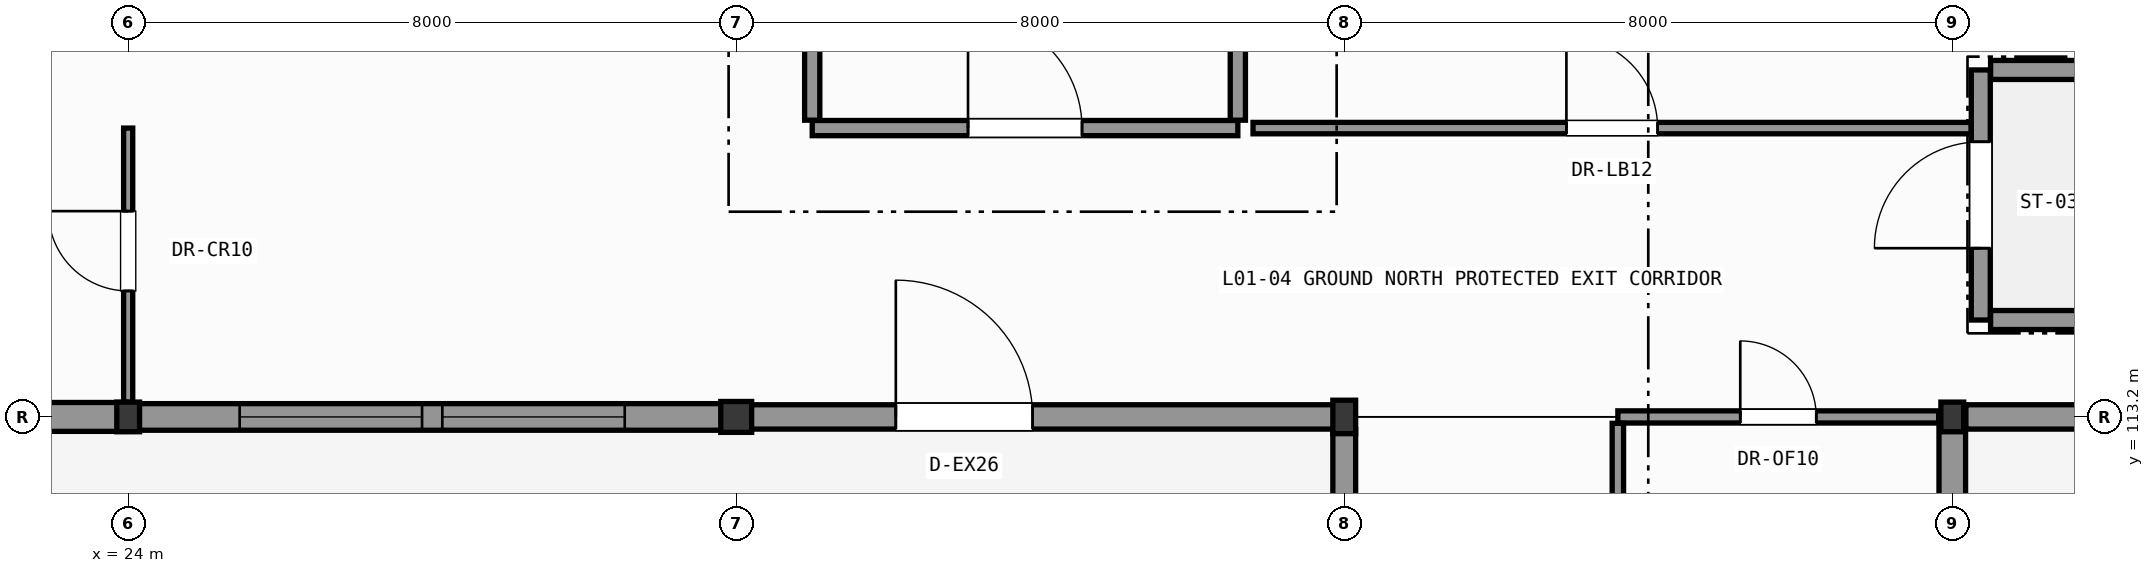
"""IFC4 building model, lengths in metres.
Left out: names, types, materials, properties, quantities, classifications, styles, units other than length and angle.
Written with IfcOpenShell. Run it as: python <this file> out.ifc"""

import sys

from ifc_helpers import new_model, si_unit, direction, frame, frame_2d, origin, origin_2d, place, context, subcontext, project, spatial, rectangle, hollow_circle, i_section, extrude, element, fill, save


model = new_model("IFC4")
c1 = context("Model", 3, precision=1e-05, world=origin(), true_north=direction((0.0, 1.0)))
c2 = subcontext(c1, "Body", "Model", "MODEL_VIEW")
j1 = project(units=[si_unit("LENGTHUNIT", "METRE"), si_unit("PLANEANGLEUNIT", "RADIAN")], contexts=[c1])
p1 = place(None, origin())
s1 = spatial("IfcSite", under=j1, at=p1, CompositionType="ELEMENT")
p2 = place(p1, origin())
s2 = spatial("IfcBuilding", under=s1, at=p2, CompositionType="ELEMENT")
p3 = place(p2, origin())
s3 = spatial("IfcBuildingStorey", under=s2, at=p3, CompositionType="ELEMENT", Elevation=0.0)
p4 = place(p3, frame((24.0, 113.2, 0.0), z_axis=(0.0, 0.0, 1.0), x_axis=(1.0, 0.0, 0.0)))
e1 = element("IfcColumn", 1, at=p4, inside=s3, PredefinedType="COLUMN", context=c2, shape_type="SweptSolid", body=[
    extrude(i_section(OverallWidth=0.3, OverallDepth=0.39, WebThickness=0.011, FlangeThickness=0.019, FilletRadius=0.027, at=origin_2d()), origin(), (0.0, 0.0, 1.0), 7.8),
])
p5 = place(p3, frame((32.0, 113.2, 0.0), z_axis=(0.0, 0.0, 1.0), x_axis=(1.0, 0.0, 0.0)))
e2 = element("IfcColumn", 2, at=p5, inside=s3, PredefinedType="COLUMN", context=c2, shape_type="SweptSolid", body=[
    extrude(hollow_circle(Radius=0.203, WallThickness=0.02, at=origin_2d()), origin(), (0.0, 0.0, 1.0), 7.8),
])
p6 = place(p3, frame((40.0, 113.2, 0.0), z_axis=(0.0, 0.0, 1.0), x_axis=(1.0, 0.0, 0.0)))
e3 = element("IfcColumn", 3, at=p6, inside=s3, PredefinedType="COLUMN", context=c2, shape_type="SweptSolid", body=[
    extrude(i_section(OverallWidth=0.3, OverallDepth=0.44, WebThickness=0.011, FlangeThickness=0.021, FilletRadius=0.027, at=origin_2d()), origin(), (0.0, 0.0, 1.0), 7.8),
])
p7 = place(p3, frame((48.0, 113.2, 0.0), z_axis=(0.0, 0.0, 1.0), x_axis=(1.0, 0.0, 0.0)))
e4 = element("IfcColumn", 4, at=p7, inside=s3, PredefinedType="COLUMN", context=c2, shape_type="SweptSolid", body=[
    extrude(i_section(OverallWidth=0.3, OverallDepth=0.39, WebThickness=0.011, FlangeThickness=0.019, FilletRadius=0.027, at=origin_2d()), origin(), (0.0, 0.0, 1.0), 7.8),
])
p8 = place(p3, frame((48.0, 113.2, 0.0), z_axis=(0.0, 0.0, 1.0), x_axis=(0.0, -1.0, 0.0)))
e5 = element("IfcWall", 5, at=p8, inside=s3, PredefinedType="SOLIDWALL", context=c2, shape_type="SweptSolid", body=[
    extrude(rectangle(XDim=7.6, YDim=0.35, at=frame_2d((3.8, 0.0))), origin(), (0.0, 0.0, 1.0), 6.965),
])
p9 = place(p8, frame((2.6, 0.0, 0.95)))
e6 = element("IfcOpeningElement", 6, at=p9, cuts=e5, PredefinedType="OPENING", context=c2, shape_type="SweptSolid", body=[
    extrude(rectangle(XDim=2.4, YDim=4.6, at=frame_2d((1.2, 2.3))), frame((0.0, 0.185, 0.0), z_axis=(0.0, -1.0, 0.0), x_axis=(1.0, 0.0, 0.0)), (0.0, 0.0, 1.0), 0.37),
])
p10 = place(p3, frame((56.0, 113.2, 0.0), z_axis=(0.0, 0.0, 1.0), x_axis=(-1.0, 0.0, 0.0)))
e7 = element("IfcWall", 7, at=p10, inside=s3, PredefinedType="SOLIDWALL", context=c2, shape_type="SweptSolid", body=[
    extrude(rectangle(XDim=7.821, YDim=0.32, at=frame_2d((3.911, 0.0))), origin(), (0.0, 0.0, 1.0), 7.065),
])
p11 = place(p10, frame((2.71, 0.0, 0.95)))
e8 = element("IfcOpeningElement", 8, at=p11, cuts=e7, PredefinedType="OPENING", context=c2, shape_type="SweptSolid", body=[
    extrude(rectangle(XDim=2.4, YDim=3.0, at=frame_2d((1.2, 1.5))), frame((0.0, 0.17, 0.0), z_axis=(0.0, -1.0, 0.0), x_axis=(1.0, 0.0, 0.0)), (0.0, 0.0, 1.0), 0.34),
])
p12 = place(p3, frame((24.0, 113.2, 0.0), z_axis=(0.0, 0.0, 1.0), x_axis=(-1.0, 0.0, 0.0)))
e9 = element("IfcWall", 9, at=p12, inside=s3, PredefinedType="SOLIDWALL", context=c2, shape_type="SweptSolid", body=[
    extrude(rectangle(XDim=4.8, YDim=0.38, at=frame_2d((2.4, 0.0))), origin(), (0.0, 0.0, 1.0), 7.015),
])
p13 = place(p12, frame((1.3, 0.0, 0.95)))
e10 = element("IfcOpeningElement", 10, at=p13, cuts=e9, PredefinedType="OPENING", context=c2, shape_type="SweptSolid", body=[
    extrude(rectangle(XDim=2.2, YDim=4.2, at=frame_2d((1.1, 2.1))), frame((0.0, 0.2, 0.0), z_axis=(0.0, -1.0, 0.0), x_axis=(1.0, 0.0, 0.0)), (0.0, 0.0, 1.0), 0.4),
])
p14 = place(p3, frame((32.0, 113.2, 0.0), z_axis=(0.0, 0.0, 1.0), x_axis=(-1.0, 0.0, 0.0)))
e11 = element("IfcWall", 11, at=p14, inside=s3, PredefinedType="SOLIDWALL", context=c2, shape_type="SweptSolid", body=[
    extrude(rectangle(XDim=8.0, YDim=0.35, at=frame_2d((4.0, 0.0))), origin(), (0.0, 0.0, 1.0), 7.185),
])
p15 = place(p14, frame((1.467, 0.0, 0.95)))
e12 = element("IfcOpeningElement", 12, at=p15, cuts=e11, PredefinedType="OPENING", context=c2, shape_type="SweptSolid", body=[
    extrude(rectangle(XDim=2.4, YDim=4.6, at=frame_2d((1.2, 2.3))), frame((0.0, 0.185, 0.0), z_axis=(0.0, -1.0, 0.0), x_axis=(1.0, 0.0, 0.0)), (0.0, 0.0, 1.0), 0.37),
])
p16 = place(p14, frame((4.133, 0.0, 0.95)))
e13 = element("IfcOpeningElement", 13, at=p16, cuts=e11, PredefinedType="OPENING", context=c2, shape_type="SweptSolid", body=[
    extrude(rectangle(XDim=2.4, YDim=4.6, at=frame_2d((1.2, 2.3))), frame((0.0, 0.185, 0.0), z_axis=(0.0, -1.0, 0.0), x_axis=(1.0, 0.0, 0.0)), (0.0, 0.0, 1.0), 0.37),
])
p17 = place(p3, frame((40.0, 113.2, 0.0), z_axis=(0.0, 0.0, 1.0), x_axis=(-1.0, 0.0, 0.0)))
e14 = element("IfcWall", 14, at=p17, inside=s3, PredefinedType="SOLIDWALL", context=c2, shape_type="SweptSolid", body=[
    extrude(rectangle(XDim=8.0, YDim=0.32, at=frame_2d((4.0, 0.0))), origin(), (0.0, 0.0, 1.0), 7.145),
])
p18 = place(p17, frame((4.1, 0.0, 0.0)))
e15 = element("IfcOpeningElement", 15, at=p18, cuts=e14, PredefinedType="OPENING", context=c2, shape_type="SweptSolid", body=[
    extrude(rectangle(XDim=1.8, YDim=2.4, at=frame_2d((0.9, 1.2))), frame((0.0, 0.17, 0.0), z_axis=(0.0, -1.0, 0.0), x_axis=(1.0, 0.0, 0.0)), (0.0, 0.0, 1.0), 0.34),
])
p19 = place(p3, frame((40.0, 105.6, 0.0), z_axis=(0.0, 0.0, 1.0), x_axis=(0.0, 1.0, 0.0)))
e16 = element("IfcWall", 16, at=p19, inside=s3, PredefinedType="SOLIDWALL", context=c2, shape_type="SweptSolid", body=[
    extrude(rectangle(XDim=7.436, YDim=0.3, at=frame_2d((3.718, 0.0))), origin(), (0.0, 0.0, 1.0), 6.965),
])
p20 = place(p19, frame((2.618, 0.0, 0.95)))
e17 = element("IfcOpeningElement", 17, at=p20, cuts=e16, PredefinedType="OPENING", context=c2, shape_type="SweptSolid", body=[
    extrude(rectangle(XDim=2.2, YDim=4.2, at=frame_2d((1.1, 2.1))), frame((0.0, 0.16, 0.0), z_axis=(0.0, -1.0, 0.0), x_axis=(1.0, 0.0, 0.0)), (0.0, 0.0, 1.0), 0.32),
])
p21 = place(p3, frame((48.375, 114.475, 0.0), z_axis=(0.0, 0.0, 1.0), x_axis=(0.0, 1.0, 0.0)))
e18 = element("IfcWall", 18, at=p21, inside=s3, PredefinedType="SHEAR", context=c2, shape_type="SweptSolid", body=[
    extrude(rectangle(XDim=3.29, YDim=0.25, at=frame_2d((1.645, 0.0))), origin(), (0.0, 0.0, 1.0), 7.54),
])
p22 = place(p21, frame((0.945, 0.0, 0.0)))
e19 = element("IfcOpeningElement", 19, at=p22, cuts=e18, PredefinedType="OPENING", context=c2, shape_type="SweptSolid", body=[
    extrude(rectangle(XDim=1.4, YDim=2.2, at=frame_2d((0.7, 1.1))), frame((0.0, 0.135, 0.0), z_axis=(0.0, -1.0, 0.0), x_axis=(1.0, 0.0, 0.0)), (0.0, 0.0, 1.0), 0.27),
])
for number, where, z_axis, x_axis in (
    (20, (48.504, 114.475, 0.0), (0.0, 0.0, 1.0), (1.0, 0.0, 0.0)),
    (21, (48.504, 117.765, 0.0), (0.0, 0.0, 1.0), (1.0, 0.0, 0.0)),
):
    element("IfcWall", number, at=place(p3, frame(where, z_axis=z_axis, x_axis=x_axis)), inside=s3, PredefinedType="SHEAR", context=c2, shape_type="SweptSolid", body=[
        extrude(rectangle(XDim=6.892, YDim=0.25, at=frame_2d((3.446, 0.0))), origin(), (0.0, 0.0, 1.0), 7.54),
    ])
p23 = place(p3, frame((33.0, 117.0, 0.0), z_axis=(0.0, 0.0, 1.0), x_axis=(1.0, 0.0, 0.0)))
e22 = element("IfcWall", 22, at=p23, inside=s3, PredefinedType="PARTITIONING", context=c2, shape_type="SweptSolid", body=[
    extrude(rectangle(XDim=5.6, YDim=0.2, at=frame_2d((2.8, 0.0))), origin(), (0.0, 0.0, 1.0), 7.54),
])
p24 = place(p23, frame((2.05, 0.0, 0.0)))
e23 = element("IfcOpeningElement", 23, at=p24, cuts=e22, PredefinedType="OPENING", context=c2, shape_type="SweptSolid", body=[
    extrude(rectangle(XDim=1.5, YDim=2.2, at=frame_2d((0.75, 1.1))), frame((0.0, 0.11, 0.0), z_axis=(0.0, -1.0, 0.0), x_axis=(1.0, 0.0, 0.0)), (0.0, 0.0, 1.0), 0.22),
])
for number, where, z_axis, x_axis in (
    (24, (33.0, 117.104, 0.0), (0.0, 0.0, 1.0), (0.0, 1.0, 0.0)),
    (25, (38.6, 117.104, 0.0), (0.0, 0.0, 1.0), (0.0, 1.0, 0.0)),
):
    element("IfcWall", number, at=place(p3, frame(where, z_axis=z_axis, x_axis=x_axis)), inside=s3, PredefinedType="PARTITIONING", context=c2, shape_type="SweptSolid", body=[
        extrude(rectangle(XDim=5.096, YDim=0.2, at=frame_2d((2.548, 0.0))), origin(), (0.0, 0.0, 1.0), 7.54),
    ])
p25 = place(p3, frame((38.8, 117.0, 0.0), z_axis=(0.0, 0.0, 1.0), x_axis=(1.0, 0.0, 0.0)))
e26 = element("IfcWall", 26, at=p25, inside=s3, PredefinedType="PARTITIONING", context=c2, shape_type="SweptSolid", body=[
    extrude(rectangle(XDim=9.446, YDim=0.15, at=frame_2d((4.723, 0.0))), origin(), (0.0, 0.0, 1.0), 7.54),
])
p26 = place(p25, frame((4.123, 0.0, 0.0)))
e27 = element("IfcOpeningElement", 27, at=p26, cuts=e26, PredefinedType="OPENING", context=c2, shape_type="SweptSolid", body=[
    extrude(rectangle(XDim=1.2, YDim=2.2, at=frame_2d((0.6, 1.1))), frame((0.0, 0.085, 0.0), z_axis=(0.0, -1.0, 0.0), x_axis=(1.0, 0.0, 0.0)), (0.0, 0.0, 1.0), 0.17),
])
p27 = place(p3, frame((24.0, 113.394, 0.0), z_axis=(0.0, 0.0, 1.0), x_axis=(0.0, 1.0, 0.0)))
e28 = element("IfcWall", 28, at=p27, inside=s3, PredefinedType="PARTITIONING", context=c2, shape_type="SweptSolid", body=[
    extrude(rectangle(XDim=3.606, YDim=0.12, at=frame_2d((1.803, 0.0))), origin(), (0.0, 0.0, 1.0), 6.965),
])
p28 = place(p27, frame((1.464, 0.0, 0.0)))
e29 = element("IfcOpeningElement", 29, at=p28, cuts=e28, PredefinedType="OPENING", context=c2, shape_type="SweptSolid", body=[
    extrude(rectangle(XDim=1.05, YDim=2.2, at=frame_2d((0.525, 1.1))), frame((0.0, 0.07, 0.0), z_axis=(0.0, -1.0, 0.0), x_axis=(1.0, 0.0, 0.0)), (0.0, 0.0, 1.0), 0.14),
])
p29 = place(p3, frame((43.6, 113.2, 0.0), z_axis=(0.0, 0.0, 1.0), x_axis=(1.0, 0.0, 0.0)))
e30 = element("IfcWall", 30, at=p29, inside=s3, PredefinedType="PARTITIONING", context=c2, shape_type="SweptSolid", body=[
    extrude(rectangle(XDim=4.221, YDim=0.16, at=frame_2d((2.11, 0.0))), origin(), (0.0, 0.0, 1.0), 7.065),
])
p30 = place(p29, frame((1.611, 0.0, 0.0)))
e31 = element("IfcOpeningElement", 31, at=p30, cuts=e30, PredefinedType="OPENING", context=c2, shape_type="SweptSolid", body=[
    extrude(rectangle(XDim=1.0, YDim=2.15, at=frame_2d((0.5, 1.075))), frame((0.0, 0.09, 0.0), z_axis=(0.0, -1.0, 0.0), x_axis=(1.0, 0.0, 0.0)), (0.0, 0.0, 1.0), 0.18),
])
p31 = place(p3, frame((43.6, 83.4, 0.0), z_axis=(0.0, 0.0, 1.0), x_axis=(0.0, 1.0, 0.0)))
e32 = element("IfcWall", 32, at=p31, inside=s3, PredefinedType="PARTITIONING", context=c2, shape_type="SweptSolid", body=[
    extrude(rectangle(XDim=29.716, YDim=0.15, at=frame_2d((14.858, 0.0))), origin(), (0.0, 0.0, 1.0), 7.54),
])
p32 = place(p31, frame((14.383, 0.0, 0.0)))
e33 = element("IfcOpeningElement", 33, at=p32, cuts=e32, PredefinedType="OPENING", context=c2, shape_type="SweptSolid", body=[
    extrude(rectangle(XDim=0.95, YDim=2.1, at=frame_2d((0.475, 1.05))), frame((0.0, 0.085, 0.0), z_axis=(0.0, -1.0, 0.0), x_axis=(1.0, 0.0, 0.0)), (0.0, 0.0, 1.0), 0.17),
])
p33 = place(p15, origin())
e34 = element("IfcWindow", 34, at=p33, inside=s3, PartitioningType="SINGLE_PANEL", PredefinedType="WINDOW", context=c2, shape_type="SweptSolid", body=[
    extrude(rectangle(XDim=2.4, YDim=4.6, at=frame_2d((1.2, 2.3))), frame((0.0, 0.03, 0.0), z_axis=(0.0, -1.0, 0.0), x_axis=(1.0, 0.0, 0.0)), (0.0, 0.0, 1.0), 0.06),
])
fill(e12, e34)
p34 = place(p16, origin())
e35 = element("IfcWindow", 35, at=p34, inside=s3, PartitioningType="SINGLE_PANEL", PredefinedType="WINDOW", context=c2, shape_type="SweptSolid", body=[
    extrude(rectangle(XDim=2.4, YDim=4.6, at=frame_2d((1.2, 2.3))), frame((0.0, 0.03, 0.0), z_axis=(0.0, -1.0, 0.0), x_axis=(1.0, 0.0, 0.0)), (0.0, 0.0, 1.0), 0.06),
])
fill(e13, e35)
p35 = place(p18, origin())
e36 = element("IfcDoor", 36, at=p35, inside=s3, OperationType="SINGLE_SWING_RIGHT", PredefinedType="DOOR", context=c2, shape_type="SweptSolid", body=[
    extrude(rectangle(XDim=1.8, YDim=2.4, at=frame_2d((0.9, 1.2))), frame((0.0, 0.025, 0.0), z_axis=(0.0, -1.0, 0.0), x_axis=(1.0, 0.0, 0.0)), (0.0, 0.0, 1.0), 0.05),
])
fill(e15, e36)
p36 = place(p22, origin())
e37 = element("IfcDoor", 37, at=p36, inside=s3, OperationType="SINGLE_SWING_LEFT", PredefinedType="DOOR", context=c2, shape_type="SweptSolid", body=[
    extrude(rectangle(XDim=1.4, YDim=2.2, at=frame_2d((0.7, 1.1))), frame((0.0, 0.025, 0.0), z_axis=(0.0, -1.0, 0.0), x_axis=(1.0, 0.0, 0.0)), (0.0, 0.0, 1.0), 0.05),
])
fill(e19, e37)
p37 = place(p24, origin())
e38 = element("IfcDoor", 38, at=p37, inside=s3, OperationType="SINGLE_SWING_LEFT", PredefinedType="DOOR", context=c2, shape_type="SweptSolid", body=[
    extrude(rectangle(XDim=1.5, YDim=2.2, at=frame_2d((0.75, 1.1))), frame((0.0, 0.025, 0.0), z_axis=(0.0, -1.0, 0.0), x_axis=(1.0, 0.0, 0.0)), (0.0, 0.0, 1.0), 0.05),
])
fill(e23, e38)
p38 = place(p26, origin())
e39 = element("IfcDoor", 39, at=p38, inside=s3, OperationType="SINGLE_SWING_LEFT", PredefinedType="DOOR", context=c2, shape_type="SweptSolid", body=[
    extrude(rectangle(XDim=1.2, YDim=2.2, at=frame_2d((0.6, 1.1))), frame((0.0, 0.025, 0.0), z_axis=(0.0, -1.0, 0.0), x_axis=(1.0, 0.0, 0.0)), (0.0, 0.0, 1.0), 0.05),
])
fill(e27, e39)
p39 = place(p28, origin())
e40 = element("IfcDoor", 40, at=p39, inside=s3, OperationType="SINGLE_SWING_RIGHT", PredefinedType="DOOR", context=c2, shape_type="SweptSolid", body=[
    extrude(rectangle(XDim=1.05, YDim=2.2, at=frame_2d((0.525, 1.1))), frame((0.0, 0.025, 0.0), z_axis=(0.0, -1.0, 0.0), x_axis=(1.0, 0.0, 0.0)), (0.0, 0.0, 1.0), 0.05),
])
fill(e29, e40)
p40 = place(p30, origin())
e41 = element("IfcDoor", 41, at=p40, inside=s3, OperationType="SINGLE_SWING_LEFT", PredefinedType="DOOR", context=c2, shape_type="SweptSolid", body=[
    extrude(rectangle(XDim=1.0, YDim=2.15, at=frame_2d((0.5, 1.075))), frame((0.0, 0.025, 0.0), z_axis=(0.0, -1.0, 0.0), x_axis=(1.0, 0.0, 0.0)), (0.0, 0.0, 1.0), 0.05),
])
fill(e31, e41)
save(model, sys.argv[1])
